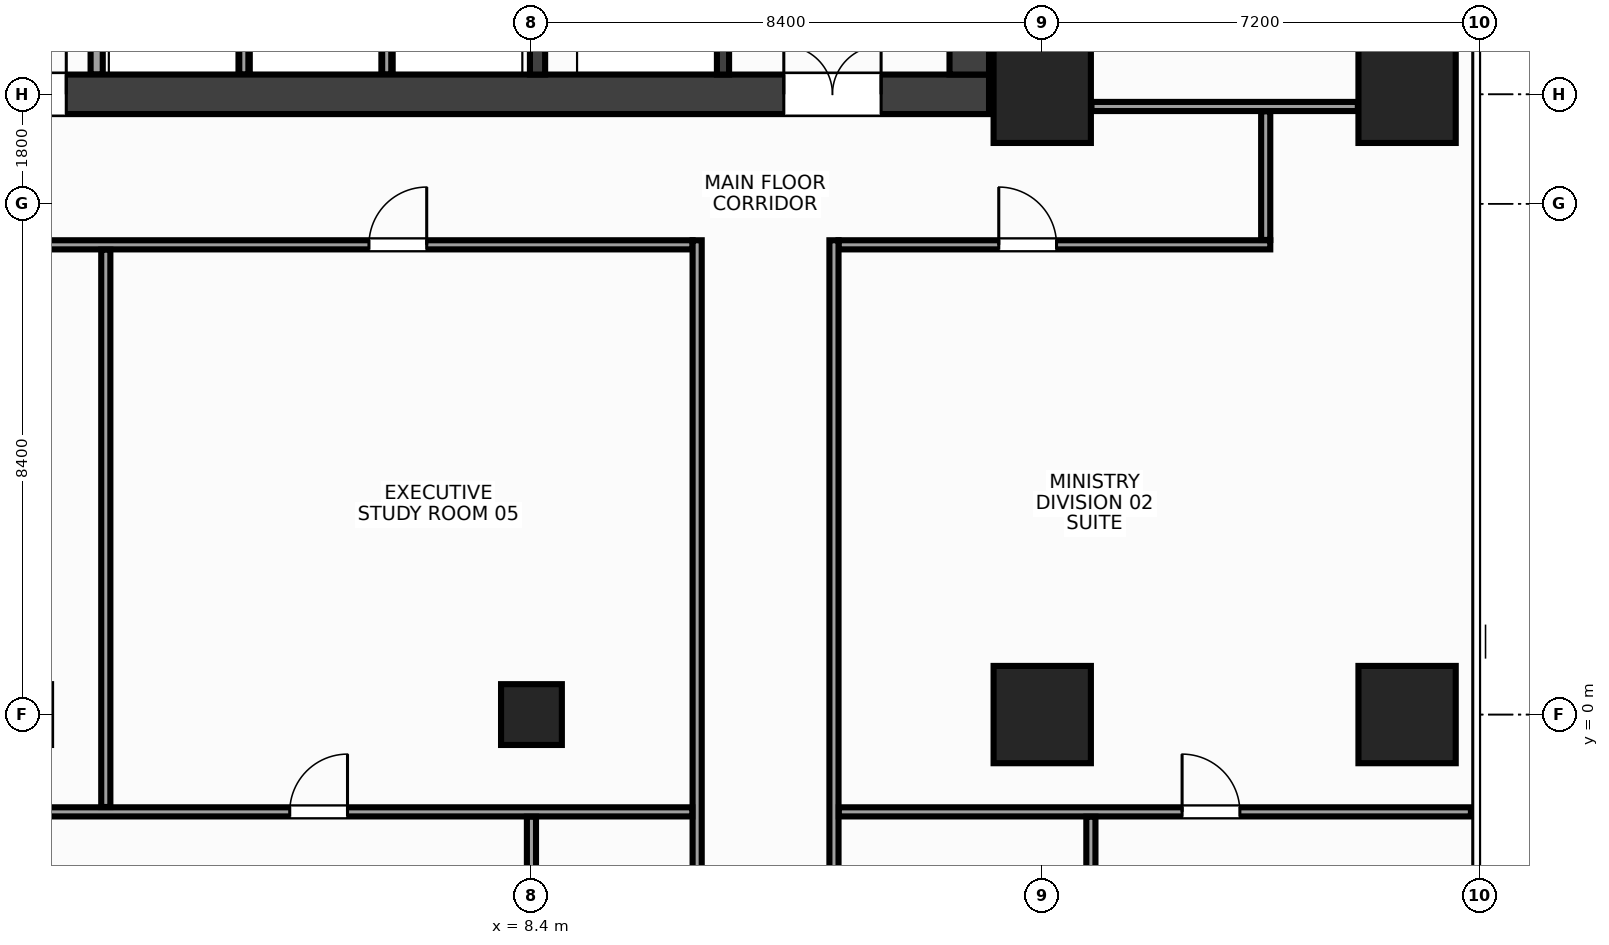
"""IFC4 building model, lengths in metres.
Left out: names, types, materials, properties, quantities, classifications, styles, units other than length and angle.
Written with IfcOpenShell. Run it as: python <this file> out.ifc"""

import sys

from ifc_helpers import new_model, si_unit, direction, frame, frame_2d, origin, origin_2d, place, context, subcontext, project, spatial, rectangle, hollow_rectangle, extrude, source, transform, mapped, element, fill, save


model = new_model("IFC4")
c1 = context("Model", 3, precision=1e-05, world=origin(), true_north=direction((0.0, 1.0)))
c2 = subcontext(c1, "Body", "Model", "MODEL_VIEW")
j1 = project(units=[si_unit("LENGTHUNIT", "METRE"), si_unit("PLANEANGLEUNIT", "RADIAN")], contexts=[c1])
p1 = place(None, origin())
s1 = spatial("IfcSite", under=j1, at=p1, CompositionType="ELEMENT")
p2 = place(p1, origin())
s2 = spatial("IfcBuilding", under=s1, at=p2, CompositionType="ELEMENT")
p3 = place(p2, frame((0.0, 0.0, 149.6)))
s3 = spatial("IfcBuildingStorey", under=s2, at=p3, CompositionType="ELEMENT", Elevation=149.6)
m1 = source(origin(), c2, "Body", "SweptSolid", [
    extrude(rectangle(XDim=31.85, YDim=0.65, at=frame_2d((15.925, 0.0))), origin(), (0.0, 0.0, 1.0), 3.6),
])
p4 = place(p3, frame((-15.925, 10.2, 0.0), z_axis=(0.0, 0.0, 1.0), x_axis=(1.0, 0.0, 0.0)))
e1 = element("IfcWall", 1, at=p4, inside=s3, PredefinedType="SHEAR", context=c2, shape_type="MappedRepresentation", body=[
    mapped(m1, transform((0.0, 0.0, 0.0), x_axis=(1.0, 0.0, 0.0), y_axis=(0.0, 1.0, 0.0), z_axis=(0.0, 0.0, 1.0), scale=1.0)),
])
p5 = place(p4, frame((1.775, 0.0, 0.0)))
e2 = element("IfcOpeningElement", 2, at=p5, cuts=e1, PredefinedType="OPENING", context=c2, shape_type="SweptSolid", body=[
    extrude(rectangle(XDim=1.6, YDim=2.15, at=frame_2d((0.8, 1.075))), frame((0.0, 0.337, 0.0), z_axis=(0.0, -1.0, 0.0), x_axis=(1.0, 0.0, 0.0)), (0.0, 0.0, 1.0), 0.674),
])
p6 = place(p4, frame((28.475, 0.0, 0.0)))
e3 = element("IfcOpeningElement", 3, at=p6, cuts=e1, PredefinedType="OPENING", context=c2, shape_type="SweptSolid", body=[
    extrude(rectangle(XDim=1.6, YDim=2.15, at=frame_2d((0.8, 1.075))), frame((0.0, 0.337, 0.0), z_axis=(0.0, -1.0, 0.0), x_axis=(1.0, 0.0, 0.0)), (0.0, 0.0, 1.0), 0.674),
])
p7 = place(p4, frame((15.175, 0.0, 0.0)))
e4 = element("IfcOpeningElement", 4, at=p7, cuts=e1, PredefinedType="OPENING", context=c2, shape_type="SweptSolid", body=[
    extrude(rectangle(XDim=1.5, YDim=2.2, at=frame_2d((0.75, 1.1))), frame((0.0, 0.337, 0.0), z_axis=(0.0, -1.0, 0.0), x_axis=(1.0, 0.0, 0.0)), (0.0, 0.0, 1.0), 0.674),
])
m2 = source(origin(), c2, "Body", "SweptSolid", [
    extrude(rectangle(XDim=12.95, YDim=0.65, at=frame_2d((6.475, 0.0))), origin(), (0.0, 0.0, 1.0), 3.6),
])
p8 = place(p3, frame((15.6, 10.525, 0.0), z_axis=(0.0, 0.0, 1.0), x_axis=(0.0, 1.0, 0.0)))
e5 = element("IfcWall", 5, at=p8, inside=s3, PredefinedType="SHEAR", context=c2, shape_type="MappedRepresentation", body=[
    mapped(m2, transform((0.0, 0.0, 0.0), x_axis=(1.0, 0.0, 0.0), y_axis=(0.0, 1.0, 0.0), z_axis=(0.0, 0.0, 1.0), scale=1.0)),
])
m3 = source(origin(), c2, "Body", "SweptSolid", [
    extrude(rectangle(XDim=12.95, YDim=0.25, at=frame_2d((6.475, 0.0))), origin(), (0.0, 0.0, 1.0), 3.6),
])
p9 = place(p3, frame((8.5, 10.525, 0.0), z_axis=(0.0, 0.0, 1.0), x_axis=(0.0, 1.0, 0.0)))
e6 = element("IfcWall", 6, at=p9, inside=s3, PredefinedType="SHEAR", context=c2, shape_type="MappedRepresentation", body=[
    mapped(m3, transform((0.0, 0.0, 0.0), x_axis=(1.0, 0.0, 0.0), y_axis=(0.0, 1.0, 0.0), z_axis=(0.0, 0.0, 1.0), scale=1.0)),
])
p10 = place(p9, frame((9.925, 0.0, 0.0)))
e7 = element("IfcOpeningElement", 7, at=p10, cuts=e6, PredefinedType="OPENING", context=c2, shape_type="SweptSolid", body=[
    extrude(rectangle(XDim=0.95, YDim=2.15, at=frame_2d((0.475, 1.075))), frame((0.0, 0.137, 0.0), z_axis=(0.0, -1.0, 0.0), x_axis=(1.0, 0.0, 0.0)), (0.0, 0.0, 1.0), 0.274),
])
m4 = source(origin(), c2, "Body", "SweptSolid", [
    extrude(rectangle(XDim=3.125, YDim=0.2, at=frame_2d((1.562, 0.0))), origin(), (0.0, 0.0, 1.0), 3.6),
])
p11 = place(p3, frame((11.55, 10.525, 0.0), z_axis=(0.0, 0.0, 1.0), x_axis=(0.0, 1.0, 0.0)))
e8 = element("IfcWall", 8, at=p11, inside=s3, PredefinedType="SHEAR", context=c2, shape_type="MappedRepresentation", body=[
    mapped(m4, transform((0.0, 0.0, 0.0), x_axis=(1.0, 0.0, 0.0), y_axis=(0.0, 1.0, 0.0), z_axis=(0.0, 0.0, 1.0), scale=1.0)),
])
p12 = place(p11, frame((0.9, 0.0, 0.0)))
e9 = element("IfcOpeningElement", 9, at=p12, cuts=e8, PredefinedType="OPENING", context=c2, shape_type="SweptSolid", body=[
    extrude(rectangle(XDim=1.1, YDim=2.15, at=frame_2d((0.55, 1.075))), frame((0.0, 0.112, 0.0), z_axis=(0.0, -1.0, 0.0), x_axis=(1.0, 0.0, 0.0)), (0.0, 0.0, 1.0), 0.224),
])
m5 = source(origin(), c2, "Body", "SweptSolid", [
    extrude(rectangle(XDim=1.6, YDim=1.6, at=origin_2d()), origin(), (0.0, 0.0, 1.0), 3.6),
])
for number, where, z_axis, x_axis in (
    (10, (16.8, 0.0, 0.0), (0.0, 0.0, 1.0), (1.0, 0.0, 0.0)),
    (11, (16.8, 10.2, 0.0), (0.0, 0.0, 1.0), (1.0, 0.0, 0.0)),
    (12, (22.8, 0.0, 0.0), (0.0, 0.0, 1.0), (1.0, 0.0, 0.0)),
    (13, (22.8, 10.2, 0.0), (0.0, 0.0, 1.0), (1.0, 0.0, 0.0)),
):
    element("IfcColumn", number, at=place(p3, frame(where, z_axis=z_axis, x_axis=x_axis)), inside=s3, PredefinedType="COLUMN", context=c2, shape_type="MappedRepresentation", body=[
        mapped(m5, transform((0.0, 0.0, 0.0), x_axis=(1.0, 0.0, 0.0), y_axis=(0.0, 1.0, 0.0), z_axis=(0.0, 0.0, 1.0), scale=1.0)),
    ])
m6 = source(origin(), c2, "Body", "SweptSolid", [
    extrude(hollow_rectangle(XDim=1.0, YDim=1.0, WallThickness=0.045, at=origin_2d()), origin(), (0.0, 0.0, 1.0), 3.6),
])
p13 = place(p3, frame((8.4, 0.0, 0.0), z_axis=(0.0, 0.0, 1.0), x_axis=(1.0, 0.0, 0.0)))
e14 = element("IfcColumn", 14, at=p13, inside=s3, PredefinedType="COLUMN", context=c2, shape_type="MappedRepresentation", body=[
    mapped(m6, transform((0.0, 0.0, 0.0), x_axis=(1.0, 0.0, 0.0), y_axis=(0.0, 1.0, 0.0), z_axis=(0.0, 0.0, 1.0), scale=1.0)),
])
m7 = source(origin(), c2, "Body", "SweptSolid", [
    extrude(rectangle(XDim=3.415, YDim=0.2, at=frame_2d((1.708, 0.0))), origin(), (0.0, 0.0, 1.0), 3.38),
])
p14 = place(p3, frame((1.25, 10.525, 0.0), z_axis=(0.0, 0.0, 1.0), x_axis=(0.0, 1.0, 0.0)))
e15 = element("IfcWall", 15, at=p14, inside=s3, PredefinedType="PARTITIONING", context=c2, shape_type="MappedRepresentation", body=[
    mapped(m7, transform((0.0, 0.0, 0.0), x_axis=(1.0, 0.0, 0.0), y_axis=(0.0, 1.0, 0.0), z_axis=(0.0, 0.0, 1.0), scale=1.0)),
])
m8 = source(origin(), c2, "Body", "SweptSolid", [
    extrude(rectangle(XDim=3.415, YDim=0.15, at=frame_2d((1.708, 0.0))), origin(), (0.0, 0.0, 1.0), 3.38),
])
for number, where, z_axis, x_axis in (
    (16, (3.67, 10.525, 0.0), (0.0, 0.0, 1.0), (0.0, 1.0, 0.0)),
    (17, (6.02, 10.525, 0.0), (0.0, 0.0, 1.0), (0.0, 1.0, 0.0)),
):
    element("IfcWall", number, at=place(p3, frame(where, z_axis=z_axis, x_axis=x_axis)), inside=s3, PredefinedType="PARTITIONING", context=c2, shape_type="MappedRepresentation", body=[
        mapped(m8, transform((0.0, 0.0, 0.0), x_axis=(1.0, 0.0, 0.0), y_axis=(0.0, 1.0, 0.0), z_axis=(0.0, 0.0, 1.0), scale=1.0)),
    ])
m9 = source(origin(), c2, "Body", "SweptSolid", [
    extrude(rectangle(XDim=4.38, YDim=0.15, at=frame_2d((2.19, 0.0))), origin(), (0.0, 0.0, 1.0), 2.915),
])
p15 = place(p3, frame((17.61, 10.0, 0.0), z_axis=(0.0, 0.0, 1.0), x_axis=(1.0, 0.0, 0.0)))
e18 = element("IfcWall", 18, at=p15, inside=s3, PredefinedType="PARTITIONING", context=c2, shape_type="MappedRepresentation", body=[
    mapped(m9, transform((0.0, 0.0, 0.0), x_axis=(1.0, 0.0, 0.0), y_axis=(0.0, 1.0, 0.0), z_axis=(0.0, 0.0, 1.0), scale=1.0)),
])
m10 = source(origin(), c2, "Body", "SweptSolid", [
    extrude(rectangle(XDim=31.6, YDim=0.15, at=frame_2d((15.8, 0.0))), origin(), (0.0, 0.0, 1.0), 2.765),
])
p16 = place(p3, frame((-20.55, 7.725, 0.0), z_axis=(0.0, 0.0, 1.0), x_axis=(1.0, 0.0, 0.0)))
e19 = element("IfcWall", 19, at=p16, inside=s3, PredefinedType="PARTITIONING", context=c2, shape_type="MappedRepresentation", body=[
    mapped(m10, transform((0.0, 0.0, 0.0), x_axis=(1.0, 0.0, 0.0), y_axis=(0.0, 1.0, 0.0), z_axis=(0.0, 0.0, 1.0), scale=1.0)),
])
p17 = place(p16, frame((0.722, 0.0, 0.0)))
e20 = element("IfcOpeningElement", 20, at=p17, cuts=e19, PredefinedType="OPENING", context=c2, shape_type="SweptSolid", body=[
    extrude(rectangle(XDim=0.95, YDim=2.15, at=frame_2d((0.475, 1.075))), frame((0.0, 0.087, 0.0), z_axis=(0.0, -1.0, 0.0), x_axis=(1.0, 0.0, 0.0)), (0.0, 0.0, 1.0), 0.174),
])
p18 = place(p16, frame((6.075, 0.0, 0.0)))
e21 = element("IfcOpeningElement", 21, at=p18, cuts=e19, PredefinedType="OPENING", context=c2, shape_type="SweptSolid", body=[
    extrude(rectangle(XDim=0.95, YDim=2.15, at=frame_2d((0.475, 1.075))), frame((0.0, 0.087, 0.0), z_axis=(0.0, -1.0, 0.0), x_axis=(1.0, 0.0, 0.0)), (0.0, 0.0, 1.0), 0.174),
])
p19 = place(p16, frame((15.875, 0.0, 0.0)))
e22 = element("IfcOpeningElement", 22, at=p19, cuts=e19, PredefinedType="OPENING", context=c2, shape_type="SweptSolid", body=[
    extrude(rectangle(XDim=0.95, YDim=2.15, at=frame_2d((0.475, 1.075))), frame((0.0, 0.087, 0.0), z_axis=(0.0, -1.0, 0.0), x_axis=(1.0, 0.0, 0.0)), (0.0, 0.0, 1.0), 0.174),
])
p20 = place(p16, frame((26.278, 0.0, 0.0)))
e23 = element("IfcOpeningElement", 23, at=p20, cuts=e19, PredefinedType="OPENING", context=c2, shape_type="SweptSolid", body=[
    extrude(rectangle(XDim=0.95, YDim=2.15, at=frame_2d((0.475, 1.075))), frame((0.0, 0.087, 0.0), z_axis=(0.0, -1.0, 0.0), x_axis=(1.0, 0.0, 0.0)), (0.0, 0.0, 1.0), 0.174),
])
m11 = source(origin(), c2, "Body", "SweptSolid", [
    extrude(rectangle(XDim=7.1, YDim=0.15, at=frame_2d((3.55, 0.0))), origin(), (0.0, 0.0, 1.0), 2.765),
])
p21 = place(p3, frame((13.45, 7.725, 0.0), z_axis=(0.0, 0.0, 1.0), x_axis=(1.0, 0.0, 0.0)))
e24 = element("IfcWall", 24, at=p21, inside=s3, PredefinedType="PARTITIONING", context=c2, shape_type="MappedRepresentation", body=[
    mapped(m11, transform((0.0, 0.0, 0.0), x_axis=(1.0, 0.0, 0.0), y_axis=(0.0, 1.0, 0.0), z_axis=(0.0, 0.0, 1.0), scale=1.0)),
])
p22 = place(p21, frame((2.635, 0.0, 0.0)))
e25 = element("IfcOpeningElement", 25, at=p22, cuts=e24, PredefinedType="OPENING", context=c2, shape_type="SweptSolid", body=[
    extrude(rectangle(XDim=0.95, YDim=2.15, at=frame_2d((0.475, 1.075))), frame((0.0, 0.087, 0.0), z_axis=(0.0, -1.0, 0.0), x_axis=(1.0, 0.0, 0.0)), (0.0, 0.0, 1.0), 0.174),
])
m12 = source(origin(), c2, "Body", "SweptSolid", [
    extrude(rectangle(XDim=2.115, YDim=0.15, at=frame_2d((1.058, 0.0))), origin(), (0.0, 0.0, 1.0), 3.38),
])
p23 = place(p3, frame((20.475, 7.805, 0.0), z_axis=(0.0, 0.0, 1.0), x_axis=(0.0, 1.0, 0.0)))
e26 = element("IfcWall", 26, at=p23, inside=s3, PredefinedType="PARTITIONING", context=c2, shape_type="MappedRepresentation", body=[
    mapped(m12, transform((0.0, 0.0, 0.0), x_axis=(1.0, 0.0, 0.0), y_axis=(0.0, 1.0, 0.0), z_axis=(0.0, 0.0, 1.0), scale=1.0)),
])
m13 = source(origin(), c2, "Body", "SweptSolid", [
    extrude(rectangle(XDim=22.595, YDim=0.15, at=frame_2d((11.297, 0.0))), origin(), (0.0, 0.0, 1.0), 2.665),
])
for number, where, z_axis, x_axis in (
    (27, (11.125, -14.795, 0.0), (0.0, 0.0, 1.0), (0.0, 1.0, 0.0)),
    (28, (13.375, -14.795, 0.0), (0.0, 0.0, 1.0), (0.0, 1.0, 0.0)),
):
    element("IfcWall", number, at=place(p3, frame(where, z_axis=z_axis, x_axis=x_axis)), inside=s3, PredefinedType="PARTITIONING", context=c2, shape_type="MappedRepresentation", body=[
        mapped(m13, transform((0.0, 0.0, 0.0), x_axis=(1.0, 0.0, 0.0), y_axis=(0.0, 1.0, 0.0), z_axis=(0.0, 0.0, 1.0), scale=1.0)),
    ])
m14 = source(origin(), c2, "Body", "SweptSolid", [
    extrude(rectangle(XDim=34.895, YDim=0.15, at=frame_2d((17.448, 0.0))), origin(), (0.0, 0.0, 1.0), 2.765),
])
p24 = place(p3, frame((-23.85, -1.6, 0.0), z_axis=(0.0, 0.0, 1.0), x_axis=(1.0, 0.0, 0.0)))
e29 = element("IfcWall", 29, at=p24, inside=s3, PredefinedType="PARTITIONING", context=c2, shape_type="MappedRepresentation", body=[
    mapped(m14, transform((0.0, 0.0, 0.0), x_axis=(1.0, 0.0, 0.0), y_axis=(0.0, 1.0, 0.0), z_axis=(0.0, 0.0, 1.0), scale=1.0)),
])
p25 = place(p24, frame((3.913, 0.0, 0.0)))
e30 = element("IfcOpeningElement", 30, at=p25, cuts=e29, PredefinedType="OPENING", context=c2, shape_type="SweptSolid", body=[
    extrude(rectangle(XDim=0.95, YDim=2.15, at=frame_2d((0.475, 1.075))), frame((0.0, 0.087, 0.0), z_axis=(0.0, -1.0, 0.0), x_axis=(1.0, 0.0, 0.0)), (0.0, 0.0, 1.0), 0.174),
])
p26 = place(p24, frame((9.675, 0.0, 0.0)))
e31 = element("IfcOpeningElement", 31, at=p26, cuts=e29, PredefinedType="OPENING", context=c2, shape_type="SweptSolid", body=[
    extrude(rectangle(XDim=0.95, YDim=2.15, at=frame_2d((0.475, 1.075))), frame((0.0, 0.087, 0.0), z_axis=(0.0, -1.0, 0.0), x_axis=(1.0, 0.0, 0.0)), (0.0, 0.0, 1.0), 0.174),
])
p27 = place(p24, frame((19.175, 0.0, 0.0)))
e32 = element("IfcOpeningElement", 32, at=p27, cuts=e29, PredefinedType="OPENING", context=c2, shape_type="SweptSolid", body=[
    extrude(rectangle(XDim=0.95, YDim=2.15, at=frame_2d((0.475, 1.075))), frame((0.0, 0.087, 0.0), z_axis=(0.0, -1.0, 0.0), x_axis=(1.0, 0.0, 0.0)), (0.0, 0.0, 1.0), 0.174),
])
p28 = place(p24, frame((28.275, 0.0, 0.0)))
e33 = element("IfcOpeningElement", 33, at=p28, cuts=e29, PredefinedType="OPENING", context=c2, shape_type="SweptSolid", body=[
    extrude(rectangle(XDim=0.95, YDim=2.15, at=frame_2d((0.475, 1.075))), frame((0.0, 0.087, 0.0), z_axis=(0.0, -1.0, 0.0), x_axis=(1.0, 0.0, 0.0)), (0.0, 0.0, 1.0), 0.174),
])
m15 = source(origin(), c2, "Body", "SweptSolid", [
    extrude(rectangle(XDim=10.395, YDim=0.15, at=frame_2d((5.198, 0.0))), origin(), (0.0, 0.0, 1.0), 2.765),
])
p29 = place(p3, frame((13.455, -1.6, 0.0), z_axis=(0.0, 0.0, 1.0), x_axis=(1.0, 0.0, 0.0)))
e34 = element("IfcWall", 34, at=p29, inside=s3, PredefinedType="PARTITIONING", context=c2, shape_type="MappedRepresentation", body=[
    mapped(m15, transform((0.0, 0.0, 0.0), x_axis=(1.0, 0.0, 0.0), y_axis=(0.0, 1.0, 0.0), z_axis=(0.0, 0.0, 1.0), scale=1.0)),
])
p30 = place(p29, frame((5.645, 0.0, 0.0)))
e35 = element("IfcOpeningElement", 35, at=p30, cuts=e34, PredefinedType="OPENING", context=c2, shape_type="SweptSolid", body=[
    extrude(rectangle(XDim=0.95, YDim=2.15, at=frame_2d((0.475, 1.075))), frame((0.0, 0.087, 0.0), z_axis=(0.0, -1.0, 0.0), x_axis=(1.0, 0.0, 0.0)), (0.0, 0.0, 1.0), 0.174),
])
m16 = source(origin(), c2, "Body", "SweptSolid", [
    extrude(rectangle(XDim=9.165, YDim=0.15, at=frame_2d((4.583, 0.0))), origin(), (0.0, 0.0, 1.0), 2.665),
])
p31 = place(p3, frame((1.4, -1.52, 0.0), z_axis=(0.0, 0.0, 1.0), x_axis=(0.0, 1.0, 0.0)))
e36 = element("IfcWall", 36, at=p31, inside=s3, PredefinedType="PARTITIONING", context=c2, shape_type="MappedRepresentation", body=[
    mapped(m16, transform((0.0, 0.0, 0.0), x_axis=(1.0, 0.0, 0.0), y_axis=(0.0, 1.0, 0.0), z_axis=(0.0, 0.0, 1.0), scale=1.0)),
])
m17 = source(origin(), c2, "Body", "SweptSolid", [
    extrude(rectangle(XDim=8.61, YDim=0.15, at=frame_2d((4.305, 0.0))), origin(), (0.0, 0.0, 1.0), 2.765),
])
p32 = place(p3, frame((8.4, -10.29, 0.0), z_axis=(0.0, 0.0, 1.0), x_axis=(0.0, 1.0, 0.0)))
e37 = element("IfcWall", 37, at=p32, inside=s3, PredefinedType="PARTITIONING", context=c2, shape_type="MappedRepresentation", body=[
    mapped(m17, transform((0.0, 0.0, 0.0), x_axis=(1.0, 0.0, 0.0), y_axis=(0.0, 1.0, 0.0), z_axis=(0.0, 0.0, 1.0), scale=1.0)),
])
m18 = source(origin(), c2, "Body", "SweptSolid", [
    extrude(rectangle(XDim=8.31, YDim=0.15, at=frame_2d((4.155, 0.0))), origin(), (0.0, 0.0, 1.0), 3.38),
])
p33 = place(p3, frame((17.6, -9.99, 0.0), z_axis=(0.0, 0.0, 1.0), x_axis=(0.0, 1.0, 0.0)))
e38 = element("IfcWall", 38, at=p33, inside=s3, PredefinedType="PARTITIONING", context=c2, shape_type="MappedRepresentation", body=[
    mapped(m18, transform((0.0, 0.0, 0.0), x_axis=(1.0, 0.0, 0.0), y_axis=(0.0, 1.0, 0.0), z_axis=(0.0, 0.0, 1.0), scale=1.0)),
])
m19 = source(origin(), c2, "Body", "SweptSolid", [
    extrude(rectangle(XDim=1.6, YDim=2.15, at=frame_2d((0.8, 1.075))), frame((0.0, 0.025, 0.0), z_axis=(0.0, -1.0, 0.0), x_axis=(1.0, 0.0, 0.0)), (0.0, 0.0, 1.0), 0.05),
])
p34 = place(p6, origin())
e39 = element("IfcDoor", 39, at=p34, inside=s3, OperationType="DOUBLE_DOOR_SINGLE_SWING", PredefinedType="DOOR", context=c2, shape_type="MappedRepresentation", body=[
    mapped(m19, transform((0.0, 0.0, 0.0), x_axis=(1.0, 0.0, 0.0), y_axis=(0.0, 1.0, 0.0), z_axis=(0.0, 0.0, 1.0), scale=1.0)),
])
fill(e3, e39)
m20 = source(origin(), c2, "Body", "SweptSolid", [
    extrude(rectangle(XDim=1.5, YDim=2.2, at=frame_2d((0.75, 1.1))), frame((0.0, 0.025, 0.0), z_axis=(0.0, -1.0, 0.0), x_axis=(1.0, 0.0, 0.0)), (0.0, 0.0, 1.0), 0.05),
])
p35 = place(p7, origin())
e40 = element("IfcDoor", 40, at=p35, inside=s3, OperationType="DOUBLE_DOOR_SINGLE_SWING", PredefinedType="DOOR", context=c2, shape_type="MappedRepresentation", body=[
    mapped(m20, transform((0.0, 0.0, 0.0), x_axis=(1.0, 0.0, 0.0), y_axis=(0.0, 1.0, 0.0), z_axis=(0.0, 0.0, 1.0), scale=1.0)),
])
fill(e4, e40)
m21 = source(origin(), c2, "Body", "SweptSolid", [
    extrude(rectangle(XDim=0.95, YDim=2.15, at=frame_2d((0.475, 1.075))), frame((0.0, 0.025, 0.0), z_axis=(0.0, -1.0, 0.0), x_axis=(1.0, 0.0, 0.0)), (0.0, 0.0, 1.0), 0.05),
])
p36 = place(p22, origin())
e41 = element("IfcDoor", 41, at=p36, inside=s3, OperationType="SINGLE_SWING_LEFT", PredefinedType="DOOR", context=c2, shape_type="MappedRepresentation", body=[
    mapped(m21, transform((0.0, 0.0, 0.0), x_axis=(1.0, 0.0, 0.0), y_axis=(0.0, 1.0, 0.0), z_axis=(0.0, 0.0, 1.0), scale=1.0)),
])
fill(e25, e41)
p37 = place(p20, origin())
e42 = element("IfcDoor", 42, at=p37, inside=s3, OperationType="SINGLE_SWING_RIGHT", PredefinedType="DOOR", context=c2, shape_type="MappedRepresentation", body=[
    mapped(m21, transform((0.0, 0.0, 0.0), x_axis=(1.0, 0.0, 0.0), y_axis=(0.0, 1.0, 0.0), z_axis=(0.0, 0.0, 1.0), scale=1.0)),
])
fill(e23, e42)
p38 = place(p30, origin())
e43 = element("IfcDoor", 43, at=p38, inside=s3, OperationType="SINGLE_SWING_LEFT", PredefinedType="DOOR", context=c2, shape_type="MappedRepresentation", body=[
    mapped(m21, transform((0.0, 0.0, 0.0), x_axis=(1.0, 0.0, 0.0), y_axis=(0.0, 1.0, 0.0), z_axis=(0.0, 0.0, 1.0), scale=1.0)),
])
fill(e35, e43)
p39 = place(p28, origin())
e44 = element("IfcDoor", 44, at=p39, inside=s3, OperationType="SINGLE_SWING_RIGHT", PredefinedType="DOOR", context=c2, shape_type="MappedRepresentation", body=[
    mapped(m21, transform((0.0, 0.0, 0.0), x_axis=(1.0, 0.0, 0.0), y_axis=(0.0, 1.0, 0.0), z_axis=(0.0, 0.0, 1.0), scale=1.0)),
])
fill(e33, e44)
save(model, sys.argv[1])
